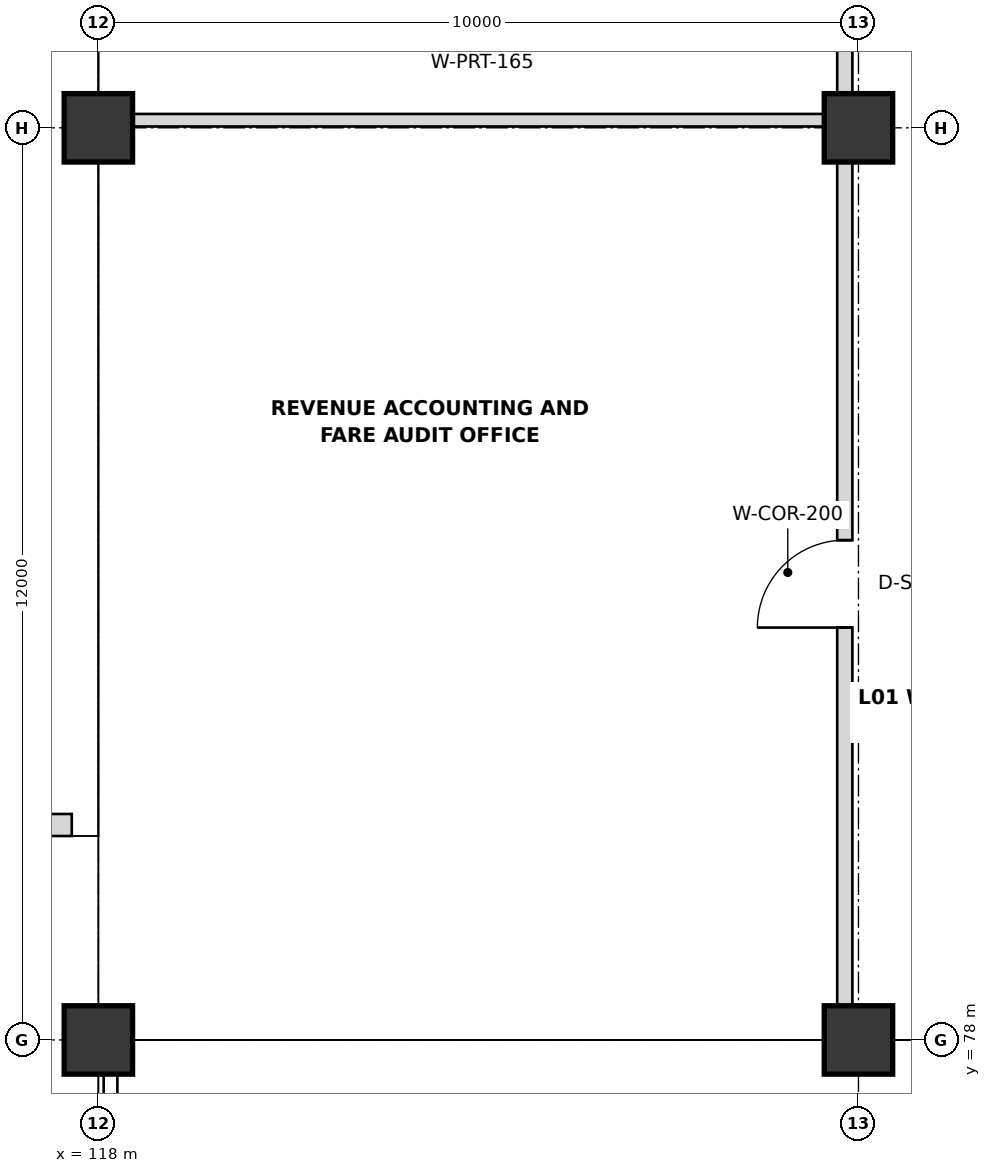
"""IFC4 building model, lengths in metres.
Left out: names, types, materials, properties, quantities, classifications, styles, units other than length and angle.
Written with IfcOpenShell. Run it as: python <this file> out.ifc"""

import sys

from ifc_helpers import new_model, si_unit, direction, frame, frame_2d, origin, origin_2d, place, context, subcontext, project, spatial, rectangle, extrude, element, fill, save


model = new_model("IFC4")
c1 = context("Model", 3, precision=1e-05, world=origin(), true_north=direction((0.0, 1.0)))
c2 = subcontext(c1, "Body", "Model", "MODEL_VIEW")
j1 = project(units=[si_unit("LENGTHUNIT", "METRE"), si_unit("PLANEANGLEUNIT", "RADIAN")], contexts=[c1])
p1 = place(None, origin())
s1 = spatial("IfcSite", under=j1, at=p1, CompositionType="ELEMENT")
p2 = place(p1, origin())
s2 = spatial("IfcBuilding", under=s1, at=p2, CompositionType="ELEMENT")
p3 = place(p2, frame((0.0, 0.0, 5.4)))
s3 = spatial("IfcBuildingStorey", under=s2, at=p3, CompositionType="ELEMENT", Elevation=5.4)
for number, where, z_axis, x_axis in (
    (1, (118.0, 78.0, 0.0), (0.0, 0.0, 1.0), (1.0, 0.0, 0.0)),
    (2, (118.0, 90.0, 0.0), (0.0, 0.0, 1.0), (1.0, 0.0, 0.0)),
    (3, (128.0, 78.0, 0.0), (0.0, 0.0, 1.0), (1.0, 0.0, 0.0)),
    (4, (128.0, 90.0, 0.0), (0.0, 0.0, 1.0), (1.0, 0.0, 0.0)),
):
    element("IfcColumn", number, at=place(p3, frame(where, z_axis=z_axis, x_axis=x_axis)), inside=s3, PredefinedType="COLUMN", context=c2, shape_type="SweptSolid", body=[
        extrude(rectangle(XDim=0.9, YDim=0.9, at=origin_2d()), origin(), (0.0, 0.0, 1.0), 4.2),
    ])
p4 = place(p3, frame((117.65, 80.828, 0.0), z_axis=(0.0, 0.0, 1.0), x_axis=(-1.0, 0.0, 0.0)))
e5 = element("IfcWall", 5, at=p4, inside=s3, PredefinedType="SOLIDWALL", context=c2, shape_type="SweptSolid", body=[
    extrude(rectangle(XDim=3.042, YDim=0.29, at=frame_2d((1.521, 0.0))), origin(), (0.0, 0.0, 1.0), 3.4),
])
p5 = place(p3, frame((127.82, 78.3, 0.0), z_axis=(0.0, 0.0, 1.0), x_axis=(0.0, 1.0, 0.0)))
e6 = element("IfcWall", 6, at=p5, inside=s3, PredefinedType="PARTITIONING", context=c2, shape_type="SweptSolid", body=[
    extrude(rectangle(XDim=11.7, YDim=0.2, at=frame_2d((5.85, 0.0))), origin(), (0.0, 0.0, 1.0), 3.018),
])
p6 = place(p5, frame((5.125, 0.0, 0.0)))
e7 = element("IfcOpeningElement", 7, at=p6, cuts=e6, PredefinedType="OPENING", context=c2, shape_type="SweptSolid", body=[
    extrude(rectangle(XDim=1.15, YDim=2.2, at=frame_2d((0.575, 1.1))), frame((0.0, 0.11, 0.0), z_axis=(0.0, -1.0, 0.0), x_axis=(1.0, 0.0, 0.0)), (0.0, 0.0, 1.0), 0.22),
])
p7 = place(p3, frame((118.4, 90.1, 0.0), z_axis=(0.0, 0.0, 1.0), x_axis=(1.0, 0.0, 0.0)))
e8 = element("IfcWall", 8, at=p7, inside=s3, PredefinedType="PARTITIONING", context=c2, shape_type="SweptSolid", body=[
    extrude(rectangle(XDim=9.3, YDim=0.165, at=frame_2d((4.65, 0.0))), origin(), (0.0, 0.0, 1.0), 3.018),
])
p8 = place(p3, frame((127.82, 90.4, 0.0), z_axis=(0.0, 0.0, 1.0), x_axis=(0.0, 1.0, 0.0)))
e9 = element("IfcWall", 9, at=p8, inside=s3, PredefinedType="PARTITIONING", context=c2, shape_type="SweptSolid", body=[
    extrude(rectangle(XDim=23.3, YDim=0.2, at=frame_2d((11.65, 0.0))), origin(), (0.0, 0.0, 1.0), 3.018),
])
p9 = place(p8, frame((17.125, 0.0, 0.0)))
e10 = element("IfcOpeningElement", 10, at=p9, cuts=e9, PredefinedType="OPENING", context=c2, shape_type="SweptSolid", body=[
    extrude(rectangle(XDim=0.95, YDim=2.3, at=frame_2d((0.475, 1.15))), frame((0.0, 0.11, 0.0), z_axis=(0.0, -1.0, 0.0), x_axis=(1.0, 0.0, 0.0)), (0.0, 0.0, 1.0), 0.22),
])
p10 = place(p6, origin())
e11 = element("IfcDoor", 11, at=p10, inside=s3, OperationType="SINGLE_SWING_LEFT", PredefinedType="DOOR", context=c2, shape_type="SweptSolid", body=[
    extrude(rectangle(XDim=1.15, YDim=2.2, at=frame_2d((0.575, 1.1))), frame((0.0, 0.025, 0.0), z_axis=(0.0, -1.0, 0.0), x_axis=(1.0, 0.0, 0.0)), (0.0, 0.0, 1.0), 0.05),
])
fill(e7, e11)
save(model, sys.argv[1])
